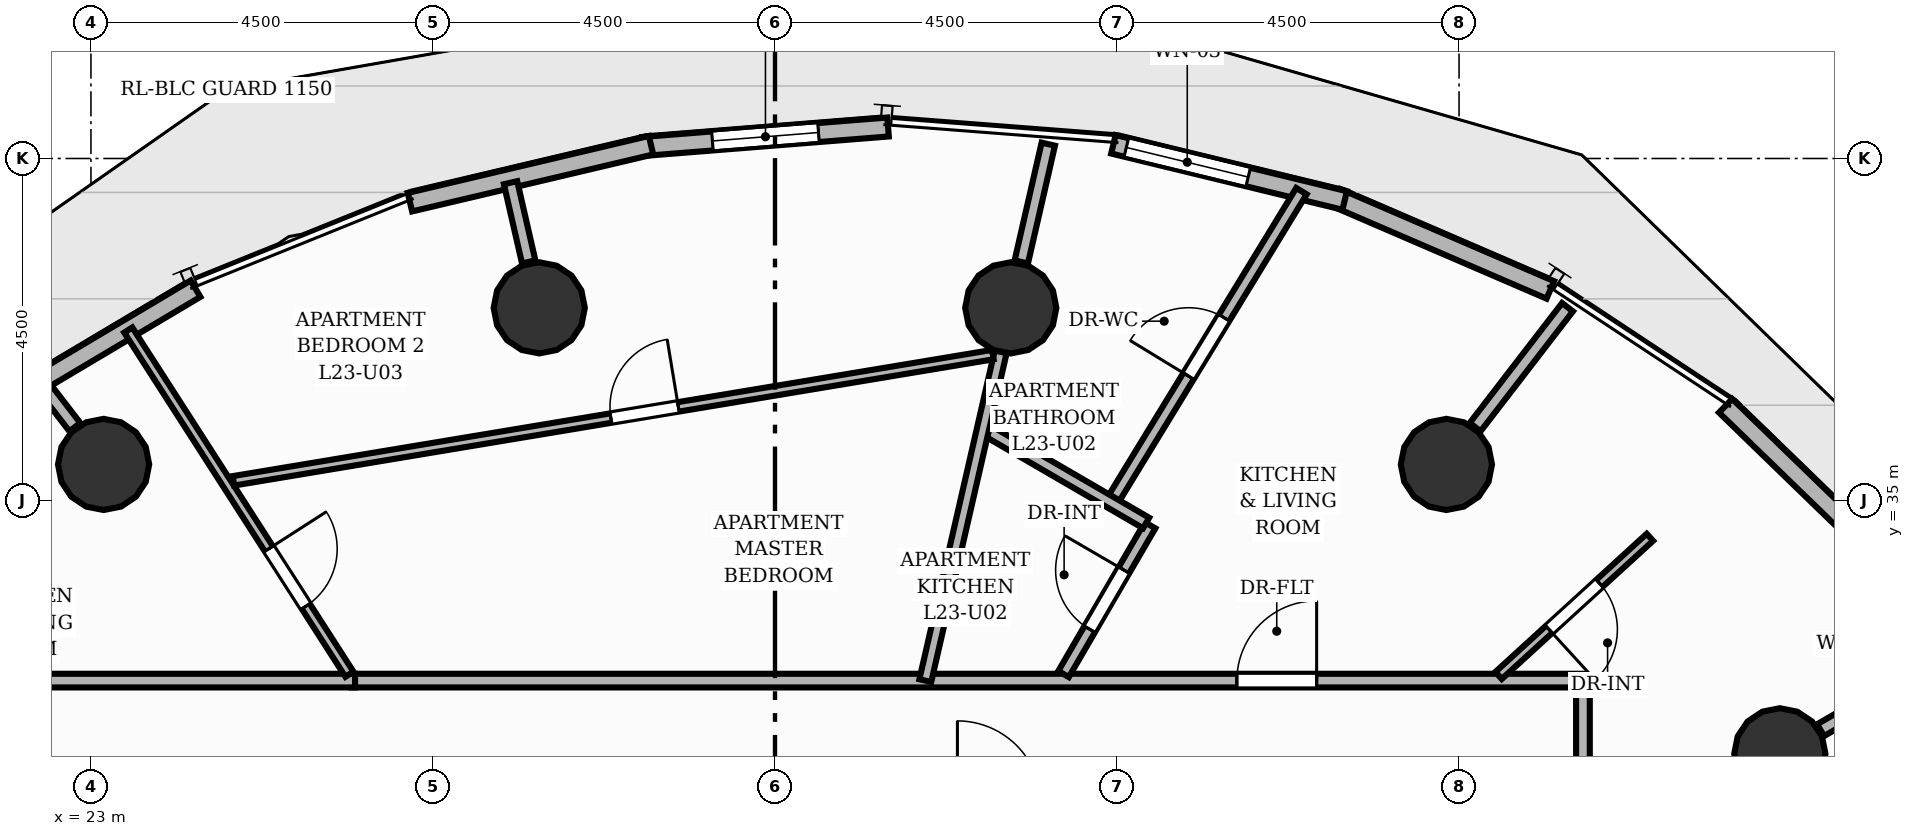
"""IFC4 building model, lengths in metres.
Left out: names, types, materials, properties, quantities, classifications, styles, units other than length and angle.
Written with IfcOpenShell. Run it as: python <this file> out.ifc"""

import sys

from ifc_helpers import new_model, si_unit, direction, frame, frame_2d, origin, origin_2d, place, context, subcontext, project, spatial, rectangle, circle, extrude, element, fill, save


model = new_model("IFC4")
c1 = context("Model", 3, precision=1e-05, world=origin(), true_north=direction((0.0, 1.0)))
c2 = subcontext(c1, "Body", "Model", "MODEL_VIEW")
j1 = project(units=[si_unit("LENGTHUNIT", "METRE"), si_unit("PLANEANGLEUNIT", "RADIAN")], contexts=[c1])
p1 = place(None, origin())
s1 = spatial("IfcSite", under=j1, at=p1, CompositionType="ELEMENT")
p2 = place(p1, origin())
s2 = spatial("IfcBuilding", under=s1, at=p2, CompositionType="ELEMENT")
p3 = place(p2, frame((0.0, 0.0, 80.48)))
s3 = spatial("IfcBuildingStorey", under=s2, at=p3, CompositionType="ELEMENT", Elevation=80.48)
for number, where, z_axis, x_axis in (
    (1, (45.22, 31.667, 0.0), (0.0, 0.0, 1.0), (1.0, 0.0, 0.0)),
    (2, (40.833, 35.474, 0.0), (0.0, 0.0, 1.0), (1.0, 0.0, 0.0)),
    (3, (35.102, 37.535, 0.0), (0.0, 0.0, 1.0), (1.0, 0.0, 0.0)),
    (4, (28.898, 37.535, 0.0), (0.0, 0.0, 1.0), (1.0, 0.0, 0.0)),
    (5, (23.167, 35.474, 0.0), (0.0, 0.0, 1.0), (1.0, 0.0, 0.0)),
):
    element("IfcColumn", number, at=place(p3, frame(where, z_axis=z_axis, x_axis=x_axis)), inside=s3, PredefinedType="COLUMN", context=c2, shape_type="SweptSolid", body=[
        extrude(circle(Radius=0.6, at=origin_2d()), origin(), (0.0, 0.0, 1.0), 3.2),
    ])
p4 = place(p3, frame((44.507, 36.247, 0.0), z_axis=(0.0, 0.0, 1.0), x_axis=(0.717880157086, -0.696166704219, 0.0)))
e6 = element("IfcWall", 6, at=p4, inside=s3, PredefinedType="SOLIDWALL", context=c2, shape_type="SweptSolid", body=[
    extrude(rectangle(XDim=2.923, YDim=0.25, at=frame_2d((1.462, 0.0))), origin(), (0.0, 0.0, 1.0), 2.96),
])
p5 = place(p3, frame((39.39, 38.982, 0.0), z_axis=(0.0, 0.0, 1.0), x_axis=(0.91829708806, -0.395891977766, 0.0)))
e7 = element("IfcWall", 7, at=p5, inside=s3, PredefinedType="SOLIDWALL", context=c2, shape_type="SweptSolid", body=[
    extrude(rectangle(XDim=3.061, YDim=0.25, at=frame_2d((1.53, 0.0))), origin(), (0.0, 0.0, 1.0), 2.96),
])
p6 = place(p3, frame((36.452, 39.687, 0.0), z_axis=(0.0, 0.0, 1.0), x_axis=(0.971748850292, -0.236017312833, 0.0)))
e8 = element("IfcWall", 8, at=p6, inside=s3, PredefinedType="SOLIDWALL", context=c2, shape_type="SweptSolid", body=[
    extrude(rectangle(XDim=3.131, YDim=0.25, at=frame_2d((1.565, 0.0))), origin(), (0.0, 0.0, 1.0), 2.96),
])
p7 = place(p6, frame((0.175, 0.0, 0.85)))
e9 = element("IfcOpeningElement", 9, at=p7, cuts=e8, PredefinedType="OPENING", context=c2, shape_type="SweptSolid", body=[
    extrude(rectangle(XDim=1.65, YDim=1.55, at=frame_2d((0.825, 0.775))), frame((0.0, 0.135, 0.0), z_axis=(0.0, -1.0, 0.0), x_axis=(1.0, 0.0, 0.0)), (0.0, 0.0, 1.0), 0.27),
])
p8 = place(p3, frame((30.262, 39.658, 0.0), z_axis=(0.0, 0.0, 1.0), x_axis=(0.996851873062, 0.079286462736, 0.0)))
e10 = element("IfcWall", 10, at=p8, inside=s3, PredefinedType="SOLIDWALL", context=c2, shape_type="SweptSolid", body=[
    extrude(rectangle(XDim=3.236, YDim=0.25, at=frame_2d((1.618, 0.0))), origin(), (0.0, 0.0, 1.0), 2.96),
])
p9 = place(p8, frame((0.918, 0.0, 0.85)))
e11 = element("IfcOpeningElement", 11, at=p9, cuts=e10, PredefinedType="OPENING", context=c2, shape_type="SweptSolid", body=[
    extrude(rectangle(XDim=1.4, YDim=1.55, at=frame_2d((0.7, 0.775))), frame((0.0, 0.135, 0.0), z_axis=(0.0, -1.0, 0.0), x_axis=(1.0, 0.0, 0.0)), (0.0, 0.0, 1.0), 0.27),
])
p10 = place(p3, frame((27.197, 38.925, 0.0), z_axis=(0.0, 0.0, 1.0), x_axis=(0.973185832187, 0.230020294824, 0.0)))
e12 = element("IfcWall", 12, at=p10, inside=s3, PredefinedType="SOLIDWALL", context=c2, shape_type="SweptSolid", body=[
    extrude(rectangle(XDim=3.26, YDim=0.25, at=frame_2d((1.63, 0.0))), origin(), (0.0, 0.0, 1.0), 2.96),
])
p11 = place(p3, frame((21.594, 36.132, 0.0), z_axis=(0.0, 0.0, 1.0), x_axis=(0.859543053771, 0.511063341196, 0.0)))
e13 = element("IfcWall", 13, at=p11, inside=s3, PredefinedType="SOLIDWALL", context=c2, shape_type="SweptSolid", body=[
    extrude(rectangle(XDim=3.236, YDim=0.25, at=frame_2d((1.618, 0.0))), origin(), (0.0, 0.0, 1.0), 2.96),
])
p12 = place(p3, frame((45.757, 31.978, 0.0), z_axis=(0.0, 0.0, 1.0), x_axis=(0.86503562166, 0.501710447628, 0.0)))
e14 = element("IfcWall", 14, at=p12, inside=s3, PredefinedType="PARTITIONING", context=c2, shape_type="SweptSolid", body=[
    extrude(rectangle(XDim=1.912, YDim=0.18, at=frame_2d((0.956, 0.0))), origin(), (0.0, 0.0, 1.0), 2.26),
])
p13 = place(p3, frame((41.212, 35.966, 0.0), z_axis=(0.0, 0.0, 1.0), x_axis=(0.609995088008, 0.792405194712, 0.0)))
e15 = element("IfcWall", 15, at=p13, inside=s3, PredefinedType="PARTITIONING", context=c2, shape_type="SweptSolid", body=[
    extrude(rectangle(XDim=1.991, YDim=0.18, at=frame_2d((0.996, 0.0))), origin(), (0.0, 0.0, 1.0), 2.26),
])
p14 = place(p3, frame((35.24, 38.139, 0.0), z_axis=(0.0, 0.0, 1.0), x_axis=(0.223333591652, 0.974742071955, 0.0)))
e16 = element("IfcWall", 16, at=p14, inside=s3, PredefinedType="PARTITIONING", context=c2, shape_type="SweptSolid", body=[
    extrude(rectangle(XDim=1.589, YDim=0.18, at=frame_2d((0.795, 0.0))), origin(), (0.0, 0.0, 1.0), 2.26),
])
p15 = place(p3, frame((28.76, 38.139, 0.0), z_axis=(0.0, 0.0, 1.0), x_axis=(-0.223308362472, 0.974747852139, 0.0)))
e17 = element("IfcWall", 17, at=p15, inside=s3, PredefinedType="PARTITIONING", context=c2, shape_type="SweptSolid", body=[
    extrude(rectangle(XDim=1.069, YDim=0.18, at=frame_2d((0.535, 0.0))), origin(), (0.0, 0.0, 1.0), 2.26),
])
p16 = place(p3, frame((22.788, 35.966, 0.0), z_axis=(0.0, 0.0, 1.0), x_axis=(-0.609945476355, 0.792443383387, 0.0)))
e18 = element("IfcWall", 18, at=p16, inside=s3, PredefinedType="PARTITIONING", context=c2, shape_type="SweptSolid", body=[
    extrude(rectangle(XDim=0.704, YDim=0.18, at=frame_2d((0.352, 0.0))), origin(), (0.0, 0.0, 1.0), 2.26),
])
p17 = place(p3, frame((26.431, 32.63, 0.0), z_axis=(0.0, 0.0, 1.0), x_axis=(1.0, 0.0, 0.0)))
e19 = element("IfcWall", 19, at=p17, inside=s3, PredefinedType="PARTITIONING", context=c2, shape_type="SweptSolid", body=[
    extrude(rectangle(XDim=16.199, YDim=0.18, at=frame_2d((8.099, 0.0))), origin(), (0.0, 0.0, 1.0), 2.955),
])
p18 = place(p17, frame((11.645, 0.0, 0.0)))
e20 = element("IfcOpeningElement", 20, at=p18, cuts=e19, PredefinedType="OPENING", context=c2, shape_type="SweptSolid", body=[
    extrude(rectangle(XDim=1.05, YDim=2.15, at=frame_2d((0.525, 1.075))), frame((0.0, 0.1, 0.0), z_axis=(0.0, -1.0, 0.0), x_axis=(1.0, 0.0, 0.0)), (0.0, 0.0, 1.0), 0.2),
])
p19 = place(p3, frame((42.63, 32.63, 0.0), z_axis=(0.0, 0.0, 1.0), x_axis=(0.0, -1.0, 0.0)))
e21 = element("IfcWall", 21, at=p19, inside=s3, PredefinedType="PARTITIONING", context=c2, shape_type="SweptSolid", body=[
    extrude(rectangle(XDim=6.23, YDim=0.18, at=frame_2d((3.115, 0.0))), origin(), (0.0, 0.0, 1.0), 2.955),
])
p20 = place(p3, frame((21.43, 32.63, 0.0), z_axis=(0.0, 0.0, 1.0), x_axis=(1.0, 0.0, 0.0)))
e22 = element("IfcWall", 22, at=p20, inside=s3, PredefinedType="PARTITIONING", context=c2, shape_type="SweptSolid", body=[
    extrude(rectangle(XDim=5.045, YDim=0.18, at=frame_2d((2.522, 0.0))), origin(), (0.0, 0.0, 1.0), 2.955),
])
p21 = place(p3, frame((36.424, 34.971, 0.0), z_axis=(0.0, 0.0, 1.0), x_axis=(0.521036660125, 0.853534298553, 0.0)))
e23 = element("IfcWall", 23, at=p21, inside=s3, PredefinedType="PLUMBINGWALL", context=c2, shape_type="SweptSolid", body=[
    extrude(rectangle(XDim=4.803, YDim=0.16, at=frame_2d((2.401, 0.0))), origin(), (0.0, 0.0, 1.0), 2.641),
])
p22 = place(p21, frame((1.951, 0.0, 0.0)))
e24 = element("IfcOpeningElement", 24, at=p22, cuts=e23, PredefinedType="OPENING", context=c2, shape_type="SweptSolid", body=[
    extrude(rectangle(XDim=0.9, YDim=2.1, at=frame_2d((0.45, 1.05))), frame((0.0, 0.09, 0.0), z_axis=(0.0, -1.0, 0.0), x_axis=(1.0, 0.0, 0.0)), (0.0, 0.0, 1.0), 0.18),
])
p23 = place(p3, frame((43.511, 34.516, 0.0), z_axis=(0.0, 0.0, 1.0), x_axis=(-0.738303163636, -0.674469004896, 0.0)))
e25 = element("IfcWall", 25, at=p23, inside=s3, PredefinedType="PARTITIONING", context=c2, shape_type="SweptSolid", body=[
    extrude(rectangle(XDim=2.696, YDim=0.125, at=frame_2d((1.348, 0.0))), origin(), (0.0, 0.0, 1.0), 2.955),
])
p24 = place(p23, frame((0.898, 0.0, 0.0)))
e26 = element("IfcOpeningElement", 26, at=p24, cuts=e25, PredefinedType="OPENING", context=c2, shape_type="SweptSolid", body=[
    extrude(rectangle(XDim=0.9, YDim=2.1, at=frame_2d((0.45, 1.05))), frame((0.0, 0.073, 0.0), z_axis=(0.0, -1.0, 0.0), x_axis=(1.0, 0.0, 0.0)), (0.0, 0.0, 1.0), 0.145),
])
p25 = place(p3, frame((35.797, 32.716, 0.0), z_axis=(0.0, 0.0, 1.0), x_axis=(0.50256985659, 0.864536603763, 0.0)))
e27 = element("IfcWall", 27, at=p25, inside=s3, PredefinedType="PLUMBINGWALL", context=c2, shape_type="SweptSolid", body=[
    extrude(rectangle(XDim=2.264, YDim=0.16, at=frame_2d((1.132, 0.0))), origin(), (0.0, 0.0, 1.0), 2.955),
])
p26 = place(p25, frame((0.682, 0.0, 0.0)))
e28 = element("IfcOpeningElement", 28, at=p26, cuts=e27, PredefinedType="OPENING", context=c2, shape_type="SweptSolid", body=[
    extrude(rectangle(XDim=0.9, YDim=2.1, at=frame_2d((0.45, 1.05))), frame((0.0, 0.09, 0.0), z_axis=(0.0, -1.0, 0.0), x_axis=(1.0, 0.0, 0.0)), (0.0, 0.0, 1.0), 0.18),
])
p27 = place(p3, frame((36.883, 34.704, 0.0), z_axis=(0.0, 0.0, 1.0), x_axis=(-0.864542002386, 0.502560569594, 0.0)))
e29 = element("IfcWall", 29, at=p27, inside=s3, PredefinedType="PLUMBINGWALL", context=c2, shape_type="SweptSolid", body=[
    extrude(rectangle(XDim=2.48, YDim=0.16, at=frame_2d((1.24, 0.0))), origin(), (0.0, 0.0, 1.0), 2.955),
])
p28 = place(p3, frame((33.978, 32.63, 0.0), z_axis=(0.0, 0.0, 1.0), x_axis=(0.223368533365, 0.974734065426, 0.0)))
e30 = element("IfcWall", 30, at=p28, inside=s3, PredefinedType="PLUMBINGWALL", context=c2, shape_type="SweptSolid", body=[
    extrude(rectangle(XDim=4.438, YDim=0.16, at=frame_2d((2.219, 0.0))), origin(), (0.0, 0.0, 1.0), 2.26),
])
p29 = place(p3, frame((23.491, 37.243, 0.0), z_axis=(0.0, 0.0, 1.0), x_axis=(0.540565030624, -0.841302233247, 0.0)))
e31 = element("IfcWall", 31, at=p29, inside=s3, PredefinedType="PARTITIONING", context=c2, shape_type="SweptSolid", body=[
    extrude(rectangle(XDim=5.383, YDim=0.125, at=frame_2d((2.691, 0.0))), origin(), (0.0, 0.0, 1.0), 2.955),
])
p30 = place(p29, frame((3.42, 0.0, 0.0)))
e32 = element("IfcOpeningElement", 32, at=p30, cuts=e31, PredefinedType="OPENING", context=c2, shape_type="SweptSolid", body=[
    extrude(rectangle(XDim=0.9, YDim=2.1, at=frame_2d((0.45, 1.05))), frame((0.0, 0.073, 0.0), z_axis=(0.0, -1.0, 0.0), x_axis=(1.0, 0.0, 0.0)), (0.0, 0.0, 1.0), 0.145),
])
p31 = place(p3, frame((24.875, 35.259, 0.0), z_axis=(0.0, 0.0, 1.0), x_axis=(0.986466792703, 0.163961174958, 0.0)))
e33 = element("IfcWall", 33, at=p31, inside=s3, PredefinedType="PARTITIONING", context=c2, shape_type="SweptSolid", body=[
    extrude(rectangle(XDim=10.128, YDim=0.125, at=frame_2d((5.064, 0.0))), origin(), (0.0, 0.0, 1.0), 2.955),
])
p32 = place(p31, frame((5.034, 0.0, 0.0)))
e34 = element("IfcOpeningElement", 34, at=p32, cuts=e33, PredefinedType="OPENING", context=c2, shape_type="SweptSolid", body=[
    extrude(rectangle(XDim=0.9, YDim=2.1, at=frame_2d((0.45, 1.05))), frame((0.0, 0.073, 0.0), z_axis=(0.0, -1.0, 0.0), x_axis=(1.0, 0.0, 0.0)), (0.0, 0.0, 1.0), 0.145),
])
p33 = place(p7, origin())
e35 = element("IfcWindow", 35, at=p33, inside=s3, PartitioningType="SINGLE_PANEL", PredefinedType="WINDOW", context=c2, shape_type="SweptSolid", body=[
    extrude(rectangle(XDim=1.65, YDim=1.55, at=frame_2d((0.825, 0.775))), frame((0.0, 0.03, 0.0), z_axis=(0.0, -1.0, 0.0), x_axis=(1.0, 0.0, 0.0)), (0.0, 0.0, 1.0), 0.06),
])
fill(e9, e35)
p34 = place(p9, origin())
e36 = element("IfcWindow", 36, at=p34, inside=s3, PartitioningType="SINGLE_PANEL", PredefinedType="WINDOW", context=c2, shape_type="SweptSolid", body=[
    extrude(rectangle(XDim=1.4, YDim=1.55, at=frame_2d((0.7, 0.775))), frame((0.0, 0.03, 0.0), z_axis=(0.0, -1.0, 0.0), x_axis=(1.0, 0.0, 0.0)), (0.0, 0.0, 1.0), 0.06),
])
fill(e11, e36)
p35 = place(p18, origin())
e37 = element("IfcDoor", 37, at=p35, inside=s3, OperationType="SINGLE_SWING_RIGHT", PredefinedType="DOOR", context=c2, shape_type="SweptSolid", body=[
    extrude(rectangle(XDim=1.05, YDim=2.15, at=frame_2d((0.525, 1.075))), frame((0.0, 0.025, 0.0), z_axis=(0.0, -1.0, 0.0), x_axis=(1.0, 0.0, 0.0)), (0.0, 0.0, 1.0), 0.05),
])
fill(e20, e37)
p36 = place(p22, origin())
e38 = element("IfcDoor", 38, at=p36, inside=s3, OperationType="SINGLE_SWING_LEFT", PredefinedType="DOOR", context=c2, shape_type="SweptSolid", body=[
    extrude(rectangle(XDim=0.9, YDim=2.1, at=frame_2d((0.45, 1.05))), frame((0.0, 0.025, 0.0), z_axis=(0.0, -1.0, 0.0), x_axis=(1.0, 0.0, 0.0)), (0.0, 0.0, 1.0), 0.05),
])
fill(e24, e38)
p37 = place(p24, origin())
e39 = element("IfcDoor", 39, at=p37, inside=s3, OperationType="SINGLE_SWING_RIGHT", PredefinedType="DOOR", context=c2, shape_type="SweptSolid", body=[
    extrude(rectangle(XDim=0.9, YDim=2.1, at=frame_2d((0.45, 1.05))), frame((0.0, 0.025, 0.0), z_axis=(0.0, -1.0, 0.0), x_axis=(1.0, 0.0, 0.0)), (0.0, 0.0, 1.0), 0.05),
])
fill(e26, e39)
p38 = place(p26, origin())
e40 = element("IfcDoor", 40, at=p38, inside=s3, OperationType="SINGLE_SWING_RIGHT", PredefinedType="DOOR", context=c2, shape_type="SweptSolid", body=[
    extrude(rectangle(XDim=0.9, YDim=2.1, at=frame_2d((0.45, 1.05))), frame((0.0, 0.025, 0.0), z_axis=(0.0, -1.0, 0.0), x_axis=(1.0, 0.0, 0.0)), (0.0, 0.0, 1.0), 0.05),
])
fill(e28, e40)
p39 = place(p30, origin())
e41 = element("IfcDoor", 41, at=p39, inside=s3, OperationType="SINGLE_SWING_LEFT", PredefinedType="DOOR", context=c2, shape_type="SweptSolid", body=[
    extrude(rectangle(XDim=0.9, YDim=2.1, at=frame_2d((0.45, 1.05))), frame((0.0, 0.025, 0.0), z_axis=(0.0, -1.0, 0.0), x_axis=(1.0, 0.0, 0.0)), (0.0, 0.0, 1.0), 0.05),
])
fill(e32, e41)
p40 = place(p32, origin())
e42 = element("IfcDoor", 42, at=p40, inside=s3, OperationType="SINGLE_SWING_RIGHT", PredefinedType="DOOR", context=c2, shape_type="SweptSolid", body=[
    extrude(rectangle(XDim=0.9, YDim=2.1, at=frame_2d((0.45, 1.05))), frame((0.0, 0.025, 0.0), z_axis=(0.0, -1.0, 0.0), x_axis=(1.0, 0.0, 0.0)), (0.0, 0.0, 1.0), 0.05),
])
fill(e34, e42)
save(model, sys.argv[1])
